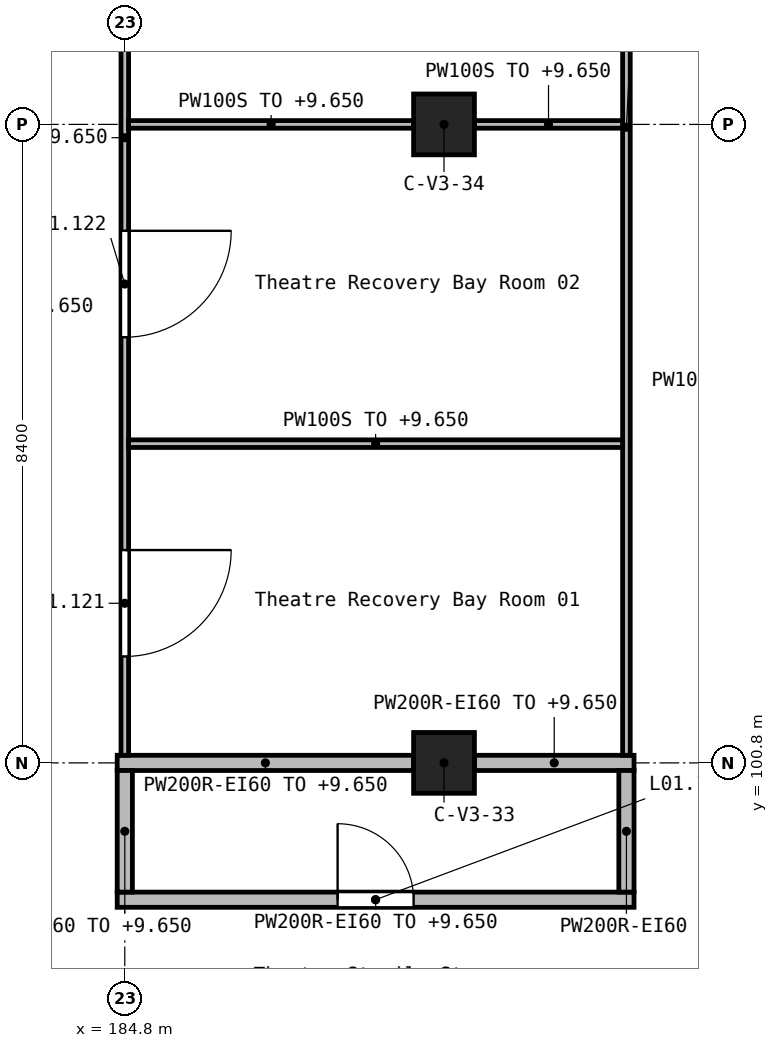
"""IFC4 building model, lengths in metres.
Left out: names, types, materials, properties, quantities, classifications, styles, units other than length and angle.
Written with IfcOpenShell. Run it as: python <this file> out.ifc"""

import sys

from ifc_helpers import new_model, si_unit, direction, frame, frame_2d, origin, origin_2d, place, context, subcontext, project, spatial, rectangle, extrude, element, fill, save


model = new_model("IFC4")
c1 = context("Model", 3, precision=1e-05, world=origin(), true_north=direction((0.0, 1.0)))
c2 = subcontext(c1, "Body", "Model", "MODEL_VIEW")
j1 = project(units=[si_unit("LENGTHUNIT", "METRE"), si_unit("PLANEANGLEUNIT", "RADIAN")], contexts=[c1])
p1 = place(None, origin())
s1 = spatial("IfcSite", under=j1, at=p1, CompositionType="ELEMENT")
p2 = place(p1, origin())
s2 = spatial("IfcBuilding", under=s1, at=p2, CompositionType="ELEMENT")
p3 = place(p2, frame((0.0, 0.0, 5.4)))
s3 = spatial("IfcBuildingStorey", under=s2, at=p3, CompositionType="ELEMENT", Elevation=5.4)
for number, where, z_axis, x_axis in (
    (1, (189.0, 100.8, 0.0), (0.0, 0.0, 1.0), (1.0, 0.0, 0.0)),
    (2, (189.0, 109.2, 0.0), (0.0, 0.0, 1.0), (1.0, 0.0, 0.0)),
):
    element("IfcColumn", number, at=place(p3, frame(where, z_axis=z_axis, x_axis=x_axis)), inside=s3, PredefinedType="COLUMN", context=c2, shape_type="SweptSolid", body=[
        extrude(rectangle(XDim=0.8, YDim=0.8, at=origin_2d()), origin(), (0.0, 0.0, 1.0), 4.5),
    ])
p4 = place(p3, frame((184.7, 99.0, 0.0), z_axis=(0.0, 0.0, 1.0), x_axis=(1.0, 0.0, 0.0)))
e3 = element("IfcWall", 3, at=p4, inside=s3, PredefinedType="SOLIDWALL", context=c2, shape_type="SweptSolid", body=[
    extrude(rectangle(XDim=6.8, YDim=0.2, at=frame_2d((3.4, 0.0))), origin(), (0.0, 0.0, 1.0), 4.25),
])
p5 = place(p4, frame((2.9, 0.0, 0.0)))
e4 = element("IfcOpeningElement", 4, at=p5, cuts=e3, PredefinedType="OPENING", context=c2, shape_type="SweptSolid", body=[
    extrude(rectangle(XDim=1.0, YDim=2.1, at=frame_2d((0.5, 1.05))), frame((0.0, 0.11, 0.0), z_axis=(0.0, -1.0, 0.0), x_axis=(1.0, 0.0, 0.0)), (0.0, 0.0, 1.0), 0.22),
])
p6 = place(p3, frame((184.7, 100.8, 0.0), z_axis=(0.0, 0.0, 1.0), x_axis=(1.0, 0.0, 0.0)))
e5 = element("IfcWall", 5, at=p6, inside=s3, PredefinedType="SOLIDWALL", context=c2, shape_type="SweptSolid", body=[
    extrude(rectangle(XDim=3.9, YDim=0.2, at=frame_2d((1.95, 0.0))), origin(), (0.0, 0.0, 1.0), 4.25),
])
p7 = place(p3, frame((189.4, 100.8, 0.0), z_axis=(0.0, 0.0, 1.0), x_axis=(1.0, 0.0, 0.0)))
e6 = element("IfcWall", 6, at=p7, inside=s3, PredefinedType="SOLIDWALL", context=c2, shape_type="SweptSolid", body=[
    extrude(rectangle(XDim=2.1, YDim=0.2, at=frame_2d((1.05, 0.0))), origin(), (0.0, 0.0, 1.0), 4.25),
])
for number, where, z_axis, x_axis in (
    (7, (184.8, 99.1, 0.0), (0.0, 0.0, 1.0), (0.0, 1.0, 0.0)),
    (8, (191.4, 99.1, 0.0), (0.0, 0.0, 1.0), (0.0, 1.0, 0.0)),
):
    element("IfcWall", number, at=place(p3, frame(where, z_axis=z_axis, x_axis=x_axis)), inside=s3, PredefinedType="SOLIDWALL", context=c2, shape_type="SweptSolid", body=[
        extrude(rectangle(XDim=1.6, YDim=0.2, at=frame_2d((0.8, 0.0))), origin(), (0.0, 0.0, 1.0), 4.25),
    ])
p8 = place(p3, frame((184.8, 117.15, 0.0), z_axis=(0.0, 0.0, 1.0), x_axis=(0.0, -1.0, 0.0)))
e9 = element("IfcWall", 9, at=p8, inside=s3, PredefinedType="PARTITIONING", context=c2, shape_type="SweptSolid", body=[
    extrude(rectangle(XDim=16.25, YDim=0.1, at=frame_2d((8.125, 0.0))), origin(), (0.0, 0.0, 1.0), 4.25),
])
p9 = place(p8, frame((13.55, 0.0, 0.0)))
e10 = element("IfcOpeningElement", 10, at=p9, cuts=e9, PredefinedType="OPENING", context=c2, shape_type="SweptSolid", body=[
    extrude(rectangle(XDim=1.4, YDim=2.1, at=frame_2d((0.7, 1.05))), frame((0.0, 0.06, 0.0), z_axis=(0.0, -1.0, 0.0), x_axis=(1.0, 0.0, 0.0)), (0.0, 0.0, 1.0), 0.12),
])
p10 = place(p8, frame((9.35, 0.0, 0.0)))
e11 = element("IfcOpeningElement", 11, at=p10, cuts=e9, PredefinedType="OPENING", context=c2, shape_type="SweptSolid", body=[
    extrude(rectangle(XDim=1.4, YDim=2.1, at=frame_2d((0.7, 1.05))), frame((0.0, 0.06, 0.0), z_axis=(0.0, -1.0, 0.0), x_axis=(1.0, 0.0, 0.0)), (0.0, 0.0, 1.0), 0.12),
])
p11 = place(p8, frame((5.4, 0.0, 0.0)))
e12 = element("IfcOpeningElement", 12, at=p11, cuts=e9, PredefinedType="OPENING", context=c2, shape_type="SweptSolid", body=[
    extrude(rectangle(XDim=0.9, YDim=2.1, at=frame_2d((0.45, 1.05))), frame((0.0, 0.06, 0.0), z_axis=(0.0, -1.0, 0.0), x_axis=(1.0, 0.0, 0.0)), (0.0, 0.0, 1.0), 0.12),
])
p12 = place(p8, frame((0.95, 0.0, 0.0)))
e13 = element("IfcOpeningElement", 13, at=p12, cuts=e9, PredefinedType="OPENING", context=c2, shape_type="SweptSolid", body=[
    extrude(rectangle(XDim=1.4, YDim=2.1, at=frame_2d((0.7, 1.05))), frame((0.0, 0.06, 0.0), z_axis=(0.0, -1.0, 0.0), x_axis=(1.0, 0.0, 0.0)), (0.0, 0.0, 1.0), 0.12),
])
p13 = place(p3, frame((191.4, 117.425, 0.0), z_axis=(0.0, 0.0, 1.0), x_axis=(0.0, -1.0, 0.0)))
e14 = element("IfcWall", 14, at=p13, inside=s3, PredefinedType="PARTITIONING", context=c2, shape_type="SweptSolid", body=[
    extrude(rectangle(XDim=16.525, YDim=0.1, at=frame_2d((8.263, 0.0))), origin(), (0.0, 0.0, 1.0), 4.25),
])
p14 = place(p3, frame((184.85, 105.0, 0.0), z_axis=(0.0, 0.0, 1.0), x_axis=(1.0, 0.0, 0.0)))
e15 = element("IfcWall", 15, at=p14, inside=s3, PredefinedType="PARTITIONING", context=c2, shape_type="SweptSolid", body=[
    extrude(rectangle(XDim=6.5, YDim=0.1, at=frame_2d((3.25, 0.0))), origin(), (0.0, 0.0, 1.0), 4.25),
])
p15 = place(p3, frame((184.85, 109.2, 0.0), z_axis=(0.0, 0.0, 1.0), x_axis=(1.0, 0.0, 0.0)))
e16 = element("IfcWall", 16, at=p15, inside=s3, PredefinedType="PARTITIONING", context=c2, shape_type="SweptSolid", body=[
    extrude(rectangle(XDim=3.75, YDim=0.1, at=frame_2d((1.875, 0.0))), origin(), (0.0, 0.0, 1.0), 4.25),
])
p16 = place(p3, frame((189.4, 109.2, 0.0), z_axis=(0.0, 0.0, 1.0), x_axis=(1.0, 0.0, 0.0)))
e17 = element("IfcWall", 17, at=p16, inside=s3, PredefinedType="PARTITIONING", context=c2, shape_type="SweptSolid", body=[
    extrude(rectangle(XDim=1.95, YDim=0.1, at=frame_2d((0.975, 0.0))), origin(), (0.0, 0.0, 1.0), 4.25),
])
p17 = place(p5, origin())
e18 = element("IfcDoor", 18, at=p17, inside=s3, OperationType="SINGLE_SWING_LEFT", PredefinedType="DOOR", context=c2, shape_type="SweptSolid", body=[
    extrude(rectangle(XDim=1.0, YDim=2.1, at=frame_2d((0.5, 1.05))), frame((0.0, 0.025, 0.0), z_axis=(0.0, -1.0, 0.0), x_axis=(1.0, 0.0, 0.0)), (0.0, 0.0, 1.0), 0.05),
])
fill(e4, e18)
p18 = place(p9, origin())
e19 = element("IfcDoor", 19, at=p18, inside=s3, OperationType="DOUBLE_DOOR_SINGLE_SWING", PredefinedType="DOOR", context=c2, shape_type="SweptSolid", body=[
    extrude(rectangle(XDim=1.4, YDim=2.1, at=frame_2d((0.7, 1.05))), frame((0.0, 0.025, 0.0), z_axis=(0.0, -1.0, 0.0), x_axis=(1.0, 0.0, 0.0)), (0.0, 0.0, 1.0), 0.05),
])
fill(e10, e19)
p19 = place(p10, origin())
e20 = element("IfcDoor", 20, at=p19, inside=s3, OperationType="DOUBLE_DOOR_SINGLE_SWING", PredefinedType="DOOR", context=c2, shape_type="SweptSolid", body=[
    extrude(rectangle(XDim=1.4, YDim=2.1, at=frame_2d((0.7, 1.05))), frame((0.0, 0.025, 0.0), z_axis=(0.0, -1.0, 0.0), x_axis=(1.0, 0.0, 0.0)), (0.0, 0.0, 1.0), 0.05),
])
fill(e11, e20)
save(model, sys.argv[1])
